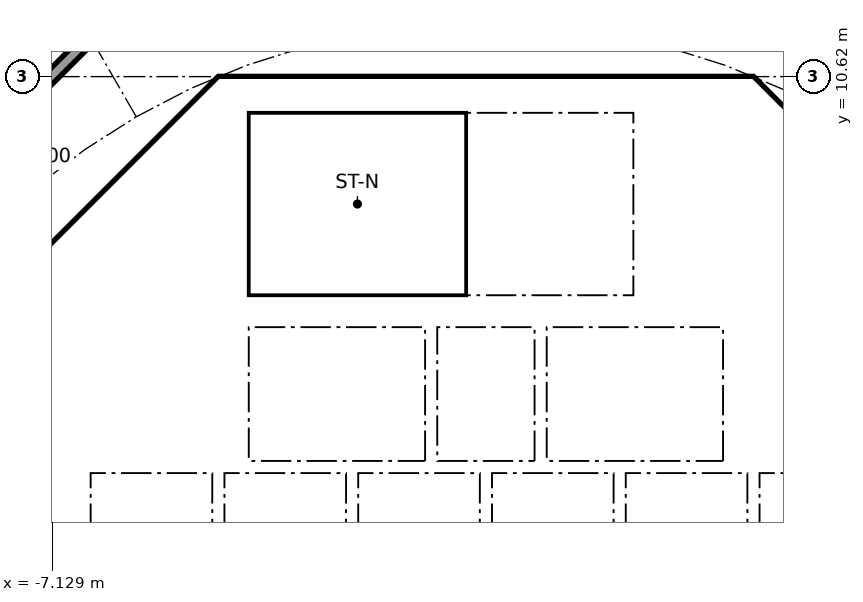
"""IFC4 building model, lengths in metres.
Left out: names, types, materials, properties, quantities, classifications, styles, units other than length and angle.
Written with IfcOpenShell. Run it as: python <this file> out.ifc"""

import sys

from ifc_helpers import new_model, si_unit, direction, frame, frame_2d, origin, place, context, subcontext, project, spatial, polyline, rectangle, outline, extrude, element, fill, save


model = new_model("IFC4")
c1 = context("Model", 3, precision=1e-05, world=origin(), true_north=direction((0.0, 1.0)))
c2 = subcontext(c1, "Body", "Model", "MODEL_VIEW")
j1 = project(units=[si_unit("LENGTHUNIT", "METRE"), si_unit("PLANEANGLEUNIT", "RADIAN")], contexts=[c1])
p1 = place(None, origin())
s1 = spatial("IfcSite", under=j1, at=p1, CompositionType="ELEMENT")
p2 = place(p1, origin())
s2 = spatial("IfcBuilding", under=s1, at=p2, CompositionType="ELEMENT")
p3 = place(p2, frame((0.0, 0.0, 134.4)))
s3 = spatial("IfcBuildingStorey", under=s2, at=p3, CompositionType="ELEMENT", Elevation=134.4)
p4 = place(p3, frame((9.988, 4.613, 0.0), z_axis=(0.0, 0.0, 1.0), x_axis=(-0.707106781187, 0.707106781187, 0.0)))
e1 = element("IfcWall", 1, at=p4, inside=s3, PredefinedType="SHEAR", context=c2, shape_type="SweptSolid", body=[
    extrude(rectangle(XDim=7.602, YDim=0.6, at=frame_2d((3.801, 0.0))), origin(), (0.0, 0.0, 1.0), 3.44),
])
p5 = place(p4, frame((3.201, 0.0, 0.0)))
e2 = element("IfcOpeningElement", 2, at=p5, cuts=e1, PredefinedType="OPENING", context=c2, shape_type="SweptSolid", body=[
    extrude(rectangle(XDim=1.2, YDim=2.1, at=frame_2d((0.6, 1.05))), frame((0.0, 0.31, 0.0), z_axis=(0.0, -1.0, 0.0), x_axis=(1.0, 0.0, 0.0)), (0.0, 0.0, 1.0), 0.62),
])
p6 = place(p3, frame((-4.613, 9.988, 0.0), z_axis=(0.0, 0.0, 1.0), x_axis=(-0.707106781187, -0.707106781187, 0.0)))
e3 = element("IfcWall", 3, at=p6, inside=s3, PredefinedType="SHEAR", context=c2, shape_type="SweptSolid", body=[
    extrude(rectangle(XDim=7.602, YDim=0.6, at=frame_2d((3.801, 0.0))), origin(), (0.0, 0.0, 1.0), 3.44),
])
p7 = place(p6, frame((0.351, 0.0, 0.0)))
e4 = element("IfcOpeningElement", 4, at=p7, cuts=e3, PredefinedType="OPENING", context=c2, shape_type="SweptSolid", body=[
    extrude(rectangle(XDim=1.1, YDim=2.1, at=frame_2d((0.55, 1.05))), frame((0.0, 0.31, 0.0), z_axis=(0.0, -1.0, 0.0), x_axis=(1.0, 0.0, 0.0)), (0.0, 0.0, 1.0), 0.62),
])
p8 = place(p3, frame((-6.2, 4.3, 0.0), z_axis=(0.0, 0.0, 1.0), x_axis=(0.0, 1.0, 0.0)))
e5 = element("IfcWall", 5, at=p8, inside=s3, PredefinedType="PARTITIONING", context=c2, shape_type="SweptSolid", body=[
    extrude(rectangle(XDim=3.527, YDim=0.15, at=frame_2d((1.763, 0.0))), origin(), (0.0, 0.0, 1.0), 3.44),
])
p9 = place(p8, frame((0.262, 0.0, 0.0)))
e6 = element("IfcOpeningElement", 6, at=p9, cuts=e5, PredefinedType="OPENING", context=c2, shape_type="SweptSolid", body=[
    extrude(rectangle(XDim=0.9, YDim=2.1, at=frame_2d((0.45, 1.05))), frame((0.0, 0.085, 0.0), z_axis=(0.0, -1.0, 0.0), x_axis=(1.0, 0.0, 0.0)), (0.0, 0.0, 1.0), 0.17),
])
p10 = place(p8, frame((2.138, 0.0, 0.0)))
e7 = element("IfcOpeningElement", 7, at=p10, cuts=e5, PredefinedType="OPENING", context=c2, shape_type="SweptSolid", body=[
    extrude(rectangle(XDim=0.9, YDim=2.1, at=frame_2d((0.45, 1.05))), frame((0.0, 0.085, 0.0), z_axis=(0.0, -1.0, 0.0), x_axis=(1.0, 0.0, 0.0)), (0.0, 0.0, 1.0), 0.17),
])
p11 = place(p3, frame((4.0, 4.3, 0.0), z_axis=(0.0, 0.0, 1.0), x_axis=(0.0, 1.0, 0.0)))
e8 = element("IfcWall", 8, at=p11, inside=s3, PredefinedType="SOLIDWALL", context=c2, shape_type="SweptSolid", body=[
    extrude(rectangle(XDim=2.2, YDim=0.2, at=frame_2d((1.1, 0.0))), origin(), (0.0, 0.0, 1.0), 3.44),
])
p12 = place(p11, frame((0.55, 0.0, 0.0)))
e9 = element("IfcOpeningElement", 9, at=p12, cuts=e8, PredefinedType="OPENING", context=c2, shape_type="SweptSolid", body=[
    extrude(rectangle(XDim=1.1, YDim=2.1, at=frame_2d((0.55, 1.05))), frame((0.0, 0.11, 0.0), z_axis=(0.0, -1.0, 0.0), x_axis=(1.0, 0.0, 0.0)), (0.0, 0.0, 1.0), 0.22),
])
p13 = place(p3, frame((-4.0, 4.3, 0.0), z_axis=(0.0, 0.0, 1.0), x_axis=(0.0, 1.0, 0.0)))
e10 = element("IfcWall", 10, at=p13, inside=s3, PredefinedType="SOLIDWALL", context=c2, shape_type="SweptSolid", body=[
    extrude(rectangle(XDim=2.2, YDim=0.2, at=frame_2d((1.1, 0.0))), origin(), (0.0, 0.0, 1.0), 3.44),
])
p14 = place(p13, frame((0.55, 0.0, 0.0)))
e11 = element("IfcOpeningElement", 11, at=p14, cuts=e10, PredefinedType="OPENING", context=c2, shape_type="SweptSolid", body=[
    extrude(rectangle(XDim=1.1, YDim=2.1, at=frame_2d((0.55, 1.05))), frame((0.0, 0.11, 0.0), z_axis=(0.0, -1.0, 0.0), x_axis=(1.0, 0.0, 0.0)), (0.0, 0.0, 1.0), 0.22),
])
p15 = place(p3, frame((4.0, 7.025, 0.0), z_axis=(0.0, 0.0, 1.0), x_axis=(0.0, 1.0, 0.0)))
e12 = element("IfcWall", 12, at=p15, inside=s3, PredefinedType="SOLIDWALL", context=c2, shape_type="SweptSolid", body=[
    extrude(rectangle(XDim=3.0, YDim=0.2, at=frame_2d((1.5, 0.0))), origin(), (0.0, 0.0, 1.0), 3.44),
])
p16 = place(p15, frame((0.925, 0.0, 0.0)))
e13 = element("IfcOpeningElement", 13, at=p16, cuts=e12, PredefinedType="OPENING", context=c2, shape_type="SweptSolid", body=[
    extrude(rectangle(XDim=1.1, YDim=2.1, at=frame_2d((0.55, 1.05))), frame((0.0, 0.11, 0.0), z_axis=(0.0, -1.0, 0.0), x_axis=(1.0, 0.0, 0.0)), (0.0, 0.0, 1.0), 0.22),
])
p17 = place(p3, origin())
e14 = element("IfcWall", 14, at=p17, inside=s3, PredefinedType="SHEAR", context=c2, shape_type="SweptSolid", body=[
    extrude(outline(polyline([(-4.152, 10.025), (-4.401, 9.776), (-4.825, 10.2), (-4.401, 10.625), (4.401, 10.625), (4.825, 10.2), (4.401, 9.776), (4.152, 10.025), (-4.152, 10.025)])), origin(), (0.0, 0.0, 1.0), 3.44),
])
p18 = place(p3, frame((-10.025, 4.0, 0.0), z_axis=(0.0, 0.0, 1.0), x_axis=(1.0, 0.0, 0.0)))
e15 = element("IfcWall", 15, at=p18, inside=s3, PredefinedType="PARTITIONING", context=c2, shape_type="SweptSolid", body=[
    extrude(rectangle(XDim=3.325, YDim=0.2, at=frame_2d((1.662, 0.0))), origin(), (0.0, 0.0, 1.0), 3.44),
])
p19 = place(p3, frame((-8.301, 5.8, 0.0), z_axis=(0.0, 0.0, 1.0), x_axis=(1.0, 0.0, 0.0)))
e16 = element("IfcWall", 16, at=p19, inside=s3, PredefinedType="PARTITIONING", context=c2, shape_type="SweptSolid", body=[
    extrude(rectangle(XDim=2.026, YDim=0.15, at=frame_2d((1.013, 0.0))), origin(), (0.0, 0.0, 1.0), 3.44),
])
for number, where, z_axis, x_axis in (
    (17, (-0.9, 4.3, 0.0), (0.0, 0.0, 1.0), (0.0, 1.0, 0.0)),
    (18, (0.9, 4.3, 0.0), (0.0, 0.0, 1.0), (0.0, 1.0, 0.0)),
):
    element("IfcWall", number, at=place(p3, frame(where, z_axis=z_axis, x_axis=x_axis)), inside=s3, PredefinedType="SOLIDWALL", context=c2, shape_type="SweptSolid", body=[
        extrude(rectangle(XDim=2.2, YDim=0.2, at=frame_2d((1.1, 0.0))), origin(), (0.0, 0.0, 1.0), 3.44),
    ])
p20 = place(p3, origin())
e19 = element("IfcWall", 19, at=p20, inside=s3, PredefinedType="SOLIDWALL", context=c2, shape_type="SweptSolid", body=[
    extrude(outline(polyline([(-6.5, 2.1), (-6.7, 2.1), (-6.7, 4.3), (6.7, 4.3), (6.7, 2.1), (6.5, 2.1), (6.5, 4.1), (4.5, 4.1), (4.5, 2.1), (4.3, 2.1), (4.3, 4.1), (2.3, 4.1), (2.3, 2.1), (2.1, 2.1), (2.1, 4.1), (0.1, 4.1), (0.1, 2.1), (-0.1, 2.1), (-0.1, 4.1), (-2.1, 4.1), (-2.1, 2.1), (-2.3, 2.1), (-2.3, 4.1), (-4.3, 4.1), (-4.3, 2.1), (-4.5, 2.1), (-4.5, 4.1), (-6.5, 4.1), (-6.5, 2.1)])), origin(), (0.0, 0.0, 1.0), 3.44),
])
p21 = place(p3, origin())
e20 = element("IfcWall", 20, at=p21, inside=s3, PredefinedType="SOLIDWALL", context=c2, shape_type="SweptSolid", body=[
    extrude(outline(polyline([(-3.9, 7.025), (-4.1, 7.025), (-4.1, 10.025), (-3.9, 10.025), (-3.9, 7.025)])), origin(), (0.0, 0.0, 1.0), 3.44),
])
p22 = place(p3, origin())
e21 = element("IfcWall", 21, at=p22, inside=s3, PredefinedType="SOLIDWALL", context=c2, shape_type="SweptSolid", body=[
    extrude(outline(polyline([(4.1, 6.5), (-4.1, 6.5), (-4.1, 7.025), (4.1, 7.025), (4.1, 6.5)])), origin(), (0.0, 0.0, 1.0), 3.44),
])
p23 = place(p3, frame((-5.275, 12.494, 0.0), z_axis=(0.0, 0.0, 1.0), x_axis=(-0.707106781187, -0.707106781187, 0.0)))
e22 = element("IfcWall", 22, at=p23, inside=s3, PredefinedType="PARTITIONING", context=c2, shape_type="SweptSolid", body=[
    extrude(rectangle(XDim=10.209, YDim=0.2, at=frame_2d((5.104, 0.0))), origin(), (0.0, 0.0, 1.0), 3.44),
])
p24 = place(p23, frame((4.604, 0.0, 0.0)))
e23 = element("IfcOpeningElement", 23, at=p24, cuts=e22, PredefinedType="OPENING", context=c2, shape_type="SweptSolid", body=[
    extrude(rectangle(XDim=1.0, YDim=2.1, at=frame_2d((0.5, 1.05))), frame((0.0, 0.11, 0.0), z_axis=(0.0, -1.0, 0.0), x_axis=(1.0, 0.0, 0.0)), (0.0, 0.0, 1.0), 0.22),
])
p25 = place(p12, origin())
e24 = element("IfcDoor", 24, at=p25, inside=s3, OperationType="DOUBLE_DOOR_SLIDING", PredefinedType="DOOR", context=c2, shape_type="SweptSolid", body=[
    extrude(rectangle(XDim=1.1, YDim=2.1, at=frame_2d((0.55, 1.05))), frame((0.0, 0.025, 0.0), z_axis=(0.0, -1.0, 0.0), x_axis=(1.0, 0.0, 0.0)), (0.0, 0.0, 1.0), 0.05),
])
fill(e9, e24)
p26 = place(p14, origin())
e25 = element("IfcDoor", 25, at=p26, inside=s3, OperationType="DOUBLE_DOOR_SLIDING", PredefinedType="DOOR", context=c2, shape_type="SweptSolid", body=[
    extrude(rectangle(XDim=1.1, YDim=2.1, at=frame_2d((0.55, 1.05))), frame((0.0, 0.025, 0.0), z_axis=(0.0, -1.0, 0.0), x_axis=(1.0, 0.0, 0.0)), (0.0, 0.0, 1.0), 0.05),
])
fill(e11, e25)
p27 = place(p16, origin())
e26 = element("IfcDoor", 26, at=p27, inside=s3, OperationType="SINGLE_SWING_RIGHT", PredefinedType="DOOR", context=c2, shape_type="SweptSolid", body=[
    extrude(rectangle(XDim=1.1, YDim=2.1, at=frame_2d((0.55, 1.05))), frame((0.0, 0.025, 0.0), z_axis=(0.0, -1.0, 0.0), x_axis=(1.0, 0.0, 0.0)), (0.0, 0.0, 1.0), 0.05),
])
fill(e13, e26)
p28 = place(p9, origin())
e27 = element("IfcDoor", 27, at=p28, inside=s3, OperationType="SINGLE_SWING_LEFT", PredefinedType="DOOR", context=c2, shape_type="SweptSolid", body=[
    extrude(rectangle(XDim=0.9, YDim=2.1, at=frame_2d((0.45, 1.05))), frame((0.0, 0.025, 0.0), z_axis=(0.0, -1.0, 0.0), x_axis=(1.0, 0.0, 0.0)), (0.0, 0.0, 1.0), 0.05),
])
fill(e6, e27)
p29 = place(p10, origin())
e28 = element("IfcDoor", 28, at=p29, inside=s3, OperationType="SINGLE_SWING_LEFT", PredefinedType="DOOR", context=c2, shape_type="SweptSolid", body=[
    extrude(rectangle(XDim=0.9, YDim=2.1, at=frame_2d((0.45, 1.05))), frame((0.0, 0.025, 0.0), z_axis=(0.0, -1.0, 0.0), x_axis=(1.0, 0.0, 0.0)), (0.0, 0.0, 1.0), 0.05),
])
fill(e7, e28)
p30 = place(p7, origin())
e29 = element("IfcDoor", 29, at=p30, inside=s3, OperationType="SINGLE_SWING_LEFT", PredefinedType="DOOR", context=c2, shape_type="SweptSolid", body=[
    extrude(rectangle(XDim=1.1, YDim=2.1, at=frame_2d((0.55, 1.05))), frame((0.0, 0.025, 0.0), z_axis=(0.0, -1.0, 0.0), x_axis=(1.0, 0.0, 0.0)), (0.0, 0.0, 1.0), 0.05),
])
fill(e4, e29)
save(model, sys.argv[1])
